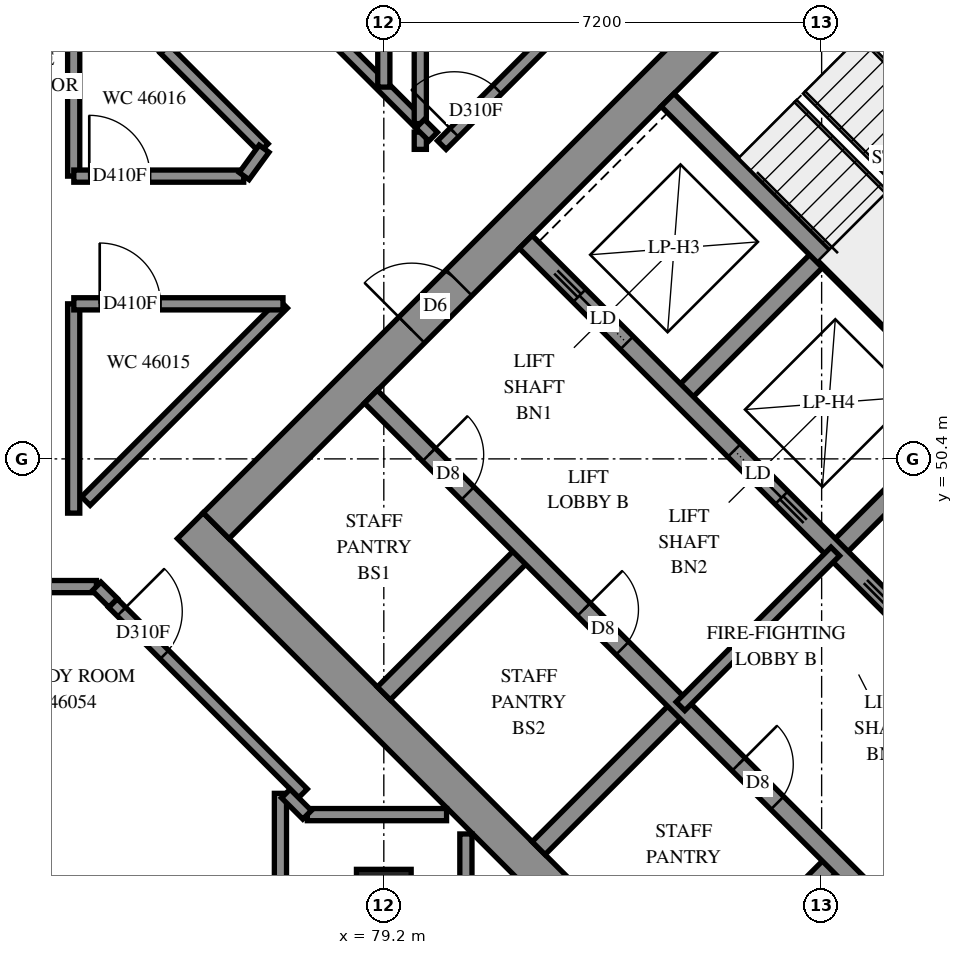
"""IFC4 building model, lengths in metres.
Left out: names, types, materials, properties, quantities, classifications, styles, units other than length and angle.
Written with IfcOpenShell. Run it as: python <this file> out.ifc"""

import sys

from ifc_helpers import new_model, si_unit, direction, frame, frame_2d, origin, origin_2d, place, context, subcontext, project, spatial, rectangle, extrude, element, fill, save


model = new_model("IFC4")
c1 = context("Model", 3, precision=1e-05, world=origin(), true_north=direction((0.0, 1.0)))
c2 = subcontext(c1, "Body", "Model", "MODEL_VIEW")
j1 = project(units=[si_unit("LENGTHUNIT", "METRE"), si_unit("PLANEANGLEUNIT", "RADIAN")], contexts=[c1])
p1 = place(None, origin())
s1 = spatial("IfcSite", under=j1, at=p1, CompositionType="ELEMENT")
p2 = place(p1, origin())
s2 = spatial("IfcBuilding", under=s1, at=p2, CompositionType="ELEMENT")
p3 = place(p2, frame((0.0, 0.0, 169.4)))
s3 = spatial("IfcBuildingStorey", under=s2, at=p3, CompositionType="ELEMENT", Elevation=169.4)
p4 = place(p3, frame((79.2, 43.2, 0.0), z_axis=(0.0, 0.0, 1.0), x_axis=(1.0, 0.0, 0.0)))
e1 = element("IfcColumn", 1, at=p4, inside=s3, PredefinedType="COLUMN", context=c2, shape_type="SweptSolid", body=[
    extrude(rectangle(XDim=0.9, YDim=0.9, at=origin_2d()), origin(), (0.0, 0.0, 1.0), 3.1),
])
p5 = place(p3, frame((76.018, 49.302, -0.3), z_axis=(0.0, 0.0, 1.0), x_axis=(0.7071067812, -0.7071067812, 0.0)))
e2 = element("IfcWall", 2, at=p5, inside=s3, PredefinedType="SHEAR", context=c2, shape_type="SweptSolid", body=[
    extrude(rectangle(XDim=15.6, YDim=0.6, at=frame_2d((7.8, 0.0))), origin(), (0.0, 0.0, 1.0), 2.7),
])
p6 = place(p3, frame((86.625, 59.908, -0.3), z_axis=(0.0, 0.0, 1.0), x_axis=(0.7071067812, -0.7071067812, 0.0)))
e3 = element("IfcWall", 3, at=p6, inside=s3, PredefinedType="SHEAR", context=c2, shape_type="SweptSolid", body=[
    extrude(rectangle(XDim=15.6, YDim=0.6, at=frame_2d((7.8, 0.0))), origin(), (0.0, 0.0, 1.0), 2.7),
])
p7 = place(p6, frame((10.6, 0.0, 0.3)))
e4 = element("IfcOpeningElement", 4, at=p7, cuts=e3, PredefinedType="OPENING", context=c2, shape_type="SweptSolid", body=[
    extrude(rectangle(XDim=0.8, YDim=2.1, at=frame_2d((0.4, 1.05))), frame((0.0, 0.31, 0.0), z_axis=(0.0, -1.0, 0.0), x_axis=(1.0, 0.0, 0.0)), (0.0, 0.0, 1.0), 0.62),
])
p8 = place(p3, frame((76.442, 49.302, -0.3), z_axis=(0.0, 0.0, 1.0), x_axis=(0.7071067812, 0.7071067812, 0.0)))
e5 = element("IfcWall", 5, at=p8, inside=s3, PredefinedType="SHEAR", context=c2, shape_type="SweptSolid", body=[
    extrude(rectangle(XDim=14.4, YDim=0.6, at=frame_2d((7.2, 0.0))), origin(), (0.0, 0.0, 1.0), 2.7),
])
p9 = place(p8, frame((4.55, 0.0, 0.3)))
e6 = element("IfcOpeningElement", 6, at=p9, cuts=e5, PredefinedType="OPENING", context=c2, shape_type="SweptSolid", body=[
    extrude(rectangle(XDim=1.1, YDim=2.1, at=frame_2d((0.55, 1.05))), frame((0.0, 0.31, 0.0), z_axis=(0.0, -1.0, 0.0), x_axis=(1.0, 0.0, 0.0)), (0.0, 0.0, 1.0), 0.62),
])
p10 = place(p8, frame((11.35, 0.0, 0.3)))
e7 = element("IfcOpeningElement", 7, at=p10, cuts=e5, PredefinedType="OPENING", context=c2, shape_type="SweptSolid", body=[
    extrude(rectangle(XDim=1.1, YDim=2.1, at=frame_2d((0.55, 1.05))), frame((0.0, 0.31, 0.0), z_axis=(0.0, -1.0, 0.0), x_axis=(1.0, 0.0, 0.0)), (0.0, 0.0, 1.0), 0.62),
])
p11 = place(p3, frame((87.049, 38.695, -0.3), z_axis=(0.0, 0.0, 1.0), x_axis=(0.7071067812, 0.7071067812, 0.0)))
e8 = element("IfcWall", 8, at=p11, inside=s3, PredefinedType="SHEAR", context=c2, shape_type="SweptSolid", body=[
    extrude(rectangle(XDim=14.4, YDim=0.6, at=frame_2d((7.2, 0.0))), origin(), (0.0, 0.0, 1.0), 2.7),
])
p12 = place(p11, frame((4.55, 0.0, 0.3)))
e9 = element("IfcOpeningElement", 9, at=p12, cuts=e8, PredefinedType="OPENING", context=c2, shape_type="SweptSolid", body=[
    extrude(rectangle(XDim=1.1, YDim=2.1, at=frame_2d((0.55, 1.05))), frame((0.0, 0.31, 0.0), z_axis=(0.0, -1.0, 0.0), x_axis=(1.0, 0.0, 0.0)), (0.0, 0.0, 1.0), 0.62),
])
p13 = place(p11, frame((11.35, 0.0, 0.3)))
e10 = element("IfcOpeningElement", 10, at=p13, cuts=e8, PredefinedType="OPENING", context=c2, shape_type="SweptSolid", body=[
    extrude(rectangle(XDim=1.1, YDim=2.1, at=frame_2d((0.55, 1.05))), frame((0.0, 0.31, 0.0), z_axis=(0.0, -1.0, 0.0), x_axis=(1.0, 0.0, 0.0)), (0.0, 0.0, 1.0), 0.62),
])
for number, where, z_axis, x_axis in (
    (11, (79.2, 46.544, 0.0), (0.0, 0.0, 1.0), (0.707, 0.707, 0.0)),
    (12, (84.079, 51.423, 0.0), (0.0, 0.0, 1.0), (0.707, 0.707, 0.0)),
):
    element("IfcWall", number, at=place(p3, frame(where, z_axis=z_axis, x_axis=x_axis)), inside=s3, PredefinedType="SOLIDWALL", context=c2, shape_type="SweptSolid", body=[
        extrude(rectangle(XDim=3.3, YDim=0.3, at=frame_2d((1.65, 0.0))), origin(), (0.0, 0.0, 1.0), 3.1),
    ])
p14 = place(p3, frame((81.746, 43.999, 0.0), z_axis=(0.0, 0.0, 1.0), x_axis=(0.7071067812, 0.7071067812, 0.0)))
e13 = element("IfcWall", 13, at=p14, inside=s3, PredefinedType="SOLIDWALL", context=c2, shape_type="SweptSolid", body=[
    extrude(rectangle(XDim=3.3, YDim=0.3, at=frame_2d((1.65, 0.0))), origin(), (0.0, 0.0, 1.0), 3.1),
])
p15 = place(p3, frame((86.625, 48.878, 0.0), z_axis=(0.0, 0.0, 1.0), x_axis=(0.7071067812, 0.7071067812, 0.0)))
e14 = element("IfcWall", 14, at=p15, inside=s3, PredefinedType="SOLIDWALL", context=c2, shape_type="SweptSolid", body=[
    extrude(rectangle(XDim=3.3, YDim=0.3, at=frame_2d((1.65, 0.0))), origin(), (0.0, 0.0, 1.0), 3.1),
])
p16 = place(p3, frame((84.291, 41.453, 0.0), z_axis=(0.0, 0.0, 1.0), x_axis=(0.7071067812, 0.7071067812, 0.0)))
e15 = element("IfcWall", 15, at=p16, inside=s3, PredefinedType="SOLIDWALL", context=c2, shape_type="SweptSolid", body=[
    extrude(rectangle(XDim=3.3, YDim=0.3, at=frame_2d((1.65, 0.0))), origin(), (0.0, 0.0, 1.0), 3.1),
])
p17 = place(p3, frame((78.988, 51.423, 0.0), z_axis=(0.0, 0.0, 1.0), x_axis=(0.7071067812, -0.7071067812, 0.0)))
e16 = element("IfcWall", 16, at=p17, inside=s3, PredefinedType="SOLIDWALL", context=c2, shape_type="SweptSolid", body=[
    extrude(rectangle(XDim=14.4, YDim=0.3, at=frame_2d((7.2, 0.0))), origin(), (0.0, 0.0, 1.0), 3.1),
])
p18 = place(p17, frame((1.35, 0.0, 0.0)))
e17 = element("IfcOpeningElement", 17, at=p18, cuts=e16, PredefinedType="OPENING", context=c2, shape_type="SweptSolid", body=[
    extrude(rectangle(XDim=0.9, YDim=2.1, at=frame_2d((0.45, 1.05))), frame((0.0, 0.16, 0.0), z_axis=(0.0, -1.0, 0.0), x_axis=(1.0, 0.0, 0.0)), (0.0, 0.0, 1.0), 0.32),
])
p19 = place(p17, frame((4.95, 0.0, 0.0)))
e18 = element("IfcOpeningElement", 18, at=p19, cuts=e16, PredefinedType="OPENING", context=c2, shape_type="SweptSolid", body=[
    extrude(rectangle(XDim=0.9, YDim=2.1, at=frame_2d((0.45, 1.05))), frame((0.0, 0.16, 0.0), z_axis=(0.0, -1.0, 0.0), x_axis=(1.0, 0.0, 0.0)), (0.0, 0.0, 1.0), 0.32),
])
p20 = place(p17, frame((8.55, 0.0, 0.0)))
e19 = element("IfcOpeningElement", 19, at=p20, cuts=e16, PredefinedType="OPENING", context=c2, shape_type="SweptSolid", body=[
    extrude(rectangle(XDim=0.9, YDim=2.1, at=frame_2d((0.45, 1.05))), frame((0.0, 0.16, 0.0), z_axis=(0.0, -1.0, 0.0), x_axis=(1.0, 0.0, 0.0)), (0.0, 0.0, 1.0), 0.32),
])
p21 = place(p17, frame((12.05, 0.0, 0.0)))
e20 = element("IfcOpeningElement", 20, at=p21, cuts=e16, PredefinedType="OPENING", context=c2, shape_type="SweptSolid", body=[
    extrude(rectangle(XDim=1.1, YDim=2.1, at=frame_2d((0.55, 1.05))), frame((0.0, 0.16, 0.0), z_axis=(0.0, -1.0, 0.0), x_axis=(1.0, 0.0, 0.0)), (0.0, 0.0, 1.0), 0.32),
])
p22 = place(p3, frame((81.534, 53.969, 0.0), z_axis=(0.0, 0.0, 1.0), x_axis=(0.707103309, -0.7071102534, 0.0)))
e21 = element("IfcWall", 21, at=p22, inside=s3, PredefinedType="SOLIDWALL", context=c2, shape_type="SweptSolid", body=[
    extrude(rectangle(XDim=14.4, YDim=0.3, at=frame_2d((7.2, 0.0))), origin(), (0.0, 0.0, 1.0), 3.1),
])
p23 = place(p22, frame((1.25, 0.0, 0.0)))
e22 = element("IfcOpeningElement", 22, at=p23, cuts=e21, PredefinedType="OPENING", context=c2, shape_type="SweptSolid", body=[
    extrude(rectangle(XDim=1.1, YDim=2.1, at=frame_2d((0.55, 1.05))), frame((0.0, 0.16, 0.0), z_axis=(0.0, -1.0, 0.0), x_axis=(1.0, 0.0, 0.0)), (0.0, 0.0, 1.0), 0.32),
])
p24 = place(p22, frame((4.85, 0.0, 0.0)))
e23 = element("IfcOpeningElement", 23, at=p24, cuts=e21, PredefinedType="OPENING", context=c2, shape_type="SweptSolid", body=[
    extrude(rectangle(XDim=1.1, YDim=2.1, at=frame_2d((0.55, 1.05))), frame((0.0, 0.16, 0.0), z_axis=(0.0, -1.0, 0.0), x_axis=(1.0, 0.0, 0.0)), (0.0, 0.0, 1.0), 0.32),
])
p25 = place(p22, frame((8.45, 0.0, 0.0)))
e24 = element("IfcOpeningElement", 24, at=p25, cuts=e21, PredefinedType="OPENING", context=c2, shape_type="SweptSolid", body=[
    extrude(rectangle(XDim=1.1, YDim=2.1, at=frame_2d((0.55, 1.05))), frame((0.0, 0.16, 0.0), z_axis=(0.0, -1.0, 0.0), x_axis=(1.0, 0.0, 0.0)), (0.0, 0.0, 1.0), 0.32),
])
p26 = place(p22, frame((12.05, 0.0, 0.0)))
e25 = element("IfcOpeningElement", 25, at=p26, cuts=e21, PredefinedType="OPENING", context=c2, shape_type="SweptSolid", body=[
    extrude(rectangle(XDim=1.1, YDim=2.1, at=frame_2d((0.55, 1.05))), frame((0.0, 0.16, 0.0), z_axis=(0.0, -1.0, 0.0), x_axis=(1.0, 0.0, 0.0)), (0.0, 0.0, 1.0), 0.32),
])
p27 = place(p3, frame((83.867, 56.302, 0.0), z_axis=(0.0, 0.0, 1.0), x_axis=(0.7071137256, -0.7070998367, 0.0)))
e26 = element("IfcWall", 26, at=p27, inside=s3, PredefinedType="SOLIDWALL", context=c2, shape_type="SweptSolid", body=[
    extrude(rectangle(XDim=7.2, YDim=0.3, at=frame_2d((3.6, 0.0))), origin(), (0.0, 0.0, 1.0), 3.1),
])
p28 = place(p3, frame((84.079, 46.332, 0.0), z_axis=(0.0, 0.0, 1.0), x_axis=(0.7071067812, 0.7071067812, 0.0)))
e27 = element("IfcWall", 27, at=p28, inside=s3, PredefinedType="PARTITIONING", context=c2, shape_type="SweptSolid", body=[
    extrude(rectangle(XDim=3.6, YDim=0.2, at=frame_2d((1.8, 0.0))), origin(), (0.0, 0.0, 1.0), 3.1),
])
p29 = place(p3, frame((55.5, 48.3, 0.0), z_axis=(0.0, 0.0, 1.0), x_axis=(1.0, 0.0, 0.0)))
e28 = element("IfcWall", 28, at=p29, inside=s3, PredefinedType="PARTITIONING", context=c2, shape_type="SweptSolid", body=[
    extrude(rectangle(XDim=18.974, YDim=0.2, at=frame_2d((9.487, 0.0))), origin(), (0.0, 0.0, 1.0), 3.1),
])
p30 = place(p29, frame((5.963, 0.0, 0.0)))
e29 = element("IfcOpeningElement", 29, at=p30, cuts=e28, PredefinedType="OPENING", context=c2, shape_type="SweptSolid", body=[
    extrude(rectangle(XDim=1.0, YDim=2.1, at=frame_2d((0.5, 1.05))), frame((0.0, 0.11, 0.0), z_axis=(0.0, -1.0, 0.0), x_axis=(1.0, 0.0, 0.0)), (0.0, 0.0, 1.0), 0.22),
])
p31 = place(p29, frame((13.161, 0.0, 0.0)))
e30 = element("IfcOpeningElement", 30, at=p31, cuts=e28, PredefinedType="OPENING", context=c2, shape_type="SweptSolid", body=[
    extrude(rectangle(XDim=0.9, YDim=2.1, at=frame_2d((0.45, 1.05))), frame((0.0, 0.11, 0.0), z_axis=(0.0, -1.0, 0.0), x_axis=(1.0, 0.0, 0.0)), (0.0, 0.0, 1.0), 0.22),
])
p32 = place(p3, frame((80.154, 55.56, 0.0), z_axis=(0.0, 0.0, 1.0), x_axis=(0.7071067812, 0.7071067812, 0.0)))
e31 = element("IfcWall", 31, at=p32, inside=s3, PredefinedType="PARTITIONING", context=c2, shape_type="SweptSolid", body=[
    extrude(rectangle(XDim=9.45, YDim=0.2, at=frame_2d((4.725, 0.0))), origin(), (0.0, 0.0, 1.0), 3.1),
])
p33 = place(p32, frame((0.292, 0.0, 0.0)))
e32 = element("IfcOpeningElement", 32, at=p33, cuts=e31, PredefinedType="OPENING", context=c2, shape_type="SweptSolid", body=[
    extrude(rectangle(XDim=1.0, YDim=2.1, at=frame_2d((0.5, 1.05))), frame((0.0, 0.11, 0.0), z_axis=(0.0, -1.0, 0.0), x_axis=(1.0, 0.0, 0.0)), (0.0, 0.0, 1.0), 0.22),
])
p34 = place(p3, frame((74.097, 61.611, 0.0), z_axis=(0.0, 0.0, 1.0), x_axis=(0.7071067812, -0.7071067812, 0.0)))
e33 = element("IfcWall", 33, at=p34, inside=s3, PredefinedType="PARTITIONING", context=c2, shape_type="SweptSolid", body=[
    extrude(rectangle(XDim=8.061, YDim=0.2, at=frame_2d((4.03, 0.0))), origin(), (0.0, 0.0, 1.0), 3.1),
])
p35 = place(p3, frame((79.8, 55.914, 0.0), z_axis=(0.0, 0.0, 1.0), x_axis=(0.0, 1.0, 0.0)))
e34 = element("IfcWall", 34, at=p35, inside=s3, PredefinedType="PARTITIONING", context=c2, shape_type="SweptSolid", body=[
    extrude(rectangle(XDim=6.504, YDim=0.2, at=frame_2d((3.252, 0.0))), origin(), (0.0, 0.0, 1.0), 3.1),
])
p36 = place(p3, frame((74.3, 49.706, 0.0), z_axis=(0.0, 0.0, 1.0), x_axis=(0.7071067812, 0.7071067812, 0.0)))
e35 = element("IfcWall", 35, at=p36, inside=s3, PredefinedType="PARTITIONING", context=c2, shape_type="SweptSolid", body=[
    extrude(rectangle(XDim=4.588, YDim=0.2, at=frame_2d((2.294, 0.0))), origin(), (0.0, 0.0, 1.0), 3.1),
])
p37 = place(p3, frame((74.745, 48.029, 0.0), z_axis=(0.0, 0.0, 1.0), x_axis=(0.7068806156, -0.7073328745, 0.0)))
e36 = element("IfcWall", 36, at=p37, inside=s3, PredefinedType="PARTITIONING", context=c2, shape_type="SweptSolid", body=[
    extrude(rectangle(XDim=4.422, YDim=0.2, at=frame_2d((2.211, 0.0))), origin(), (0.0, 0.0, 1.0), 3.1),
])
p38 = place(p37, frame((0.199, 0.0, 0.0)))
e37 = element("IfcOpeningElement", 37, at=p38, cuts=e36, PredefinedType="OPENING", context=c2, shape_type="SweptSolid", body=[
    extrude(rectangle(XDim=1.0, YDim=2.1, at=frame_2d((0.5, 1.05))), frame((0.0, 0.11, 0.0), z_axis=(0.0, -1.0, 0.0), x_axis=(1.0, 0.0, 0.0)), (0.0, 0.0, 1.0), 0.22),
])
p39 = place(p3, frame((77.5, 40.801, 0.0), z_axis=(0.0, 0.0, 1.0), x_axis=(0.0, 1.0, 0.0)))
e38 = element("IfcWall", 38, at=p39, inside=s3, PredefinedType="PARTITIONING", context=c2, shape_type="SweptSolid", body=[
    extrude(rectangle(XDim=4.099, YDim=0.2, at=frame_2d((2.05, 0.0))), origin(), (0.0, 0.0, 1.0), 3.1),
])
p40 = place(p3, frame((74.1, 55.05, 0.0), z_axis=(0.0, 0.0, 1.0), x_axis=(0.0, 1.0, 0.0)))
e39 = element("IfcWall", 39, at=p40, inside=s3, PredefinedType="PARTITIONING", context=c2, shape_type="SweptSolid", body=[
    extrude(rectangle(XDim=3.592, YDim=0.2, at=frame_2d((1.796, 0.0))), origin(), (0.0, 0.0, 1.0), 3.1),
])
p41 = place(p3, frame((74.1, 49.508, 0.0), z_axis=(0.0, 0.0, 1.0), x_axis=(0.0, 1.0, 0.0)))
e40 = element("IfcWall", 40, at=p41, inside=s3, PredefinedType="PARTITIONING", context=c2, shape_type="SweptSolid", body=[
    extrude(rectangle(XDim=3.442, YDim=0.2, at=frame_2d((1.721, 0.0))), origin(), (0.0, 0.0, 1.0), 3.1),
])
p42 = place(p3, frame((74.102, 52.95, 0.0), z_axis=(0.0, 0.0, 1.0), x_axis=(1.0, 0.0, 0.0)))
e41 = element("IfcWall", 41, at=p42, inside=s3, PredefinedType="PARTITIONING", context=c2, shape_type="SweptSolid", body=[
    extrude(rectangle(XDim=3.44, YDim=0.2, at=frame_2d((1.72, 0.0))), origin(), (0.0, 0.0, 1.0), 3.1),
])
p43 = place(p42, frame((0.426, 0.0, 0.0)))
e42 = element("IfcOpeningElement", 42, at=p43, cuts=e41, PredefinedType="OPENING", context=c2, shape_type="SweptSolid", body=[
    extrude(rectangle(XDim=1.0, YDim=2.1, at=frame_2d((0.5, 1.05))), frame((0.0, 0.11, 0.0), z_axis=(0.0, -1.0, 0.0), x_axis=(1.0, 0.0, 0.0)), (0.0, 0.0, 1.0), 0.22),
])
p44 = place(p3, frame((74.102, 55.05, 0.0), z_axis=(0.0, 0.0, 1.0), x_axis=(1.0, 0.0, 0.0)))
e43 = element("IfcWall", 43, at=p44, inside=s3, PredefinedType="PARTITIONING", context=c2, shape_type="SweptSolid", body=[
    extrude(rectangle(XDim=2.794, YDim=0.2, at=frame_2d((1.397, 0.0))), origin(), (0.0, 0.0, 1.0), 3.1),
])
p45 = place(p44, frame((0.254, 0.0, 0.0)))
e44 = element("IfcOpeningElement", 44, at=p45, cuts=e43, PredefinedType="OPENING", context=c2, shape_type="SweptSolid", body=[
    extrude(rectangle(XDim=1.0, YDim=2.1, at=frame_2d((0.5, 1.05))), frame((0.0, 0.11, 0.0), z_axis=(0.0, -1.0, 0.0), x_axis=(1.0, 0.0, 0.0)), (0.0, 0.0, 1.0), 0.22),
])
p46 = place(p3, frame((75.597, 57.141, 0.0), z_axis=(0.0, 0.0, 1.0), x_axis=(0.7071067812, -0.7071067812, 0.0)))
e45 = element("IfcWall", 45, at=p46, inside=s3, PredefinedType="PARTITIONING", context=c2, shape_type="SweptSolid", body=[
    extrude(rectangle(XDim=2.305, YDim=0.2, at=frame_2d((1.153, 0.0))), origin(), (0.0, 0.0, 1.0), 3.1),
])
for number, where, z_axis, x_axis in (
    (46, (77.942, 44.55, 0.0), (0.0, 0.0, 1.0), (1.0, 0.0, 0.0)),
    (47, (80.55, 41.942, 0.0), (0.0, 0.0, 1.0), (0.0, 1.0, 0.0)),
):
    element("IfcWall", number, at=place(p3, frame(where, z_axis=z_axis, x_axis=x_axis)), inside=s3, PredefinedType="PARTITIONING", context=c2, shape_type="SweptSolid", body=[
        extrude(rectangle(XDim=2.29, YDim=0.2, at=frame_2d((1.145, 0.0))), origin(), (0.0, 0.0, 1.0), 3.1),
    ])
p47 = place(p3, frame((75.065, 57.683, 0.0), z_axis=(0.0, 0.0, 1.0), x_axis=(0.705788785, -0.7084223253, 0.0)))
e48 = element("IfcWall", 48, at=p47, inside=s3, PredefinedType="PARTITIONING", context=c2, shape_type="SweptSolid", body=[
    extrude(rectangle(XDim=0.759, YDim=0.2, at=frame_2d((0.38, 0.0))), origin(), (0.0, 0.0, 1.0), 3.1),
])
p48 = place(p3, frame((79.2, 56.514, 0.0), z_axis=(0.0, 0.0, 1.0), x_axis=(0.0, 1.0, 0.0)))
e49 = element("IfcWall", 49, at=p48, inside=s3, PredefinedType="PARTITIONING", context=c2, shape_type="SweptSolid", body=[
    extrude(rectangle(XDim=0.636, YDim=0.2, at=frame_2d((0.318, 0.0))), origin(), (0.0, 0.0, 1.0), 3.1),
])
p49 = place(p3, frame((76.903, 55.051, 0.0), z_axis=(0.0, 0.0, 1.0), x_axis=(0.5890255926, 0.8081143801, 0.0)))
e50 = element("IfcWall", 50, at=p49, inside=s3, PredefinedType="PARTITIONING", context=c2, shape_type="SweptSolid", body=[
    extrude(rectangle(XDim=0.557, YDim=0.2, at=frame_2d((0.278, 0.0))), origin(), (0.0, 0.0, 1.0), 3.1),
])
p50 = place(p3, frame((77.588, 44.897, 0.0), z_axis=(0.0, 0.0, 1.0), x_axis=(0.7071067812, -0.7071067812, 0.0)))
e51 = element("IfcWall", 51, at=p50, inside=s3, PredefinedType="PARTITIONING", context=c2, shape_type="SweptSolid", body=[
    extrude(rectangle(XDim=0.495, YDim=0.2, at=frame_2d((0.247, 0.0))), origin(), (0.0, 0.0, 1.0), 3.1),
])
p51 = place(p3, frame((79.8, 55.49, 0.0), z_axis=(0.0, 0.0, 1.0), x_axis=(0.0, 1.0, 0.0)))
e52 = element("IfcWall", 52, at=p51, inside=s3, PredefinedType="PARTITIONING", context=c2, shape_type="SweptSolid", body=[
    extrude(rectangle(XDim=0.284, YDim=0.2, at=frame_2d((0.142, 0.0))), origin(), (0.0, 0.0, 1.0), 3.1),
])
p52 = place(p3, frame((74.477, 48.303, 0.0), z_axis=(0.0, 0.0, 1.0), x_axis=(0.7097111995, -0.7044927348, 0.0)))
e53 = element("IfcWall", 53, at=p52, inside=s3, PredefinedType="PARTITIONING", context=c2, shape_type="SweptSolid", body=[
    extrude(rectangle(XDim=0.383, YDim=0.2, at=frame_2d((0.192, 0.0))), origin(), (0.0, 0.0, 1.0), 3.1),
])
p53 = place(p3, frame((79.797, 55.911, 0.0), z_axis=(0.0, 0.0, 1.0), x_axis=(0.710418702, -0.7037792749, 0.0)))
e54 = element("IfcWall", 54, at=p53, inside=s3, PredefinedType="PARTITIONING", context=c2, shape_type="SweptSolid", body=[
    extrude(rectangle(XDim=0.301, YDim=0.2, at=frame_2d((0.151, 0.0))), origin(), (0.0, 0.0, 1.0), 3.1),
])
p54 = place(p9, origin())
e55 = element("IfcDoor", 55, at=p54, inside=s3, OperationType="DOUBLE_DOOR_SINGLE_SWING", PredefinedType="DOOR", context=c2, shape_type="SweptSolid", body=[
    extrude(rectangle(XDim=1.1, YDim=2.1, at=frame_2d((0.55, 1.05))), frame((0.0, 0.025, 0.0), z_axis=(0.0, -1.0, 0.0), x_axis=(1.0, 0.0, 0.0)), (0.0, 0.0, 1.0), 0.05),
])
fill(e6, e55)
p55 = place(p18, origin())
e56 = element("IfcDoor", 56, at=p55, inside=s3, OperationType="SINGLE_SWING_LEFT", PredefinedType="DOOR", context=c2, shape_type="SweptSolid", body=[
    extrude(rectangle(XDim=0.9, YDim=2.1, at=frame_2d((0.45, 1.05))), frame((0.0, 0.025, 0.0), z_axis=(0.0, -1.0, 0.0), x_axis=(1.0, 0.0, 0.0)), (0.0, 0.0, 1.0), 0.05),
])
fill(e17, e56)
p56 = place(p19, origin())
e57 = element("IfcDoor", 57, at=p56, inside=s3, OperationType="SINGLE_SWING_LEFT", PredefinedType="DOOR", context=c2, shape_type="SweptSolid", body=[
    extrude(rectangle(XDim=0.9, YDim=2.1, at=frame_2d((0.45, 1.05))), frame((0.0, 0.025, 0.0), z_axis=(0.0, -1.0, 0.0), x_axis=(1.0, 0.0, 0.0)), (0.0, 0.0, 1.0), 0.05),
])
fill(e18, e57)
p57 = place(p20, origin())
e58 = element("IfcDoor", 58, at=p57, inside=s3, OperationType="SINGLE_SWING_LEFT", PredefinedType="DOOR", context=c2, shape_type="SweptSolid", body=[
    extrude(rectangle(XDim=0.9, YDim=2.1, at=frame_2d((0.45, 1.05))), frame((0.0, 0.025, 0.0), z_axis=(0.0, -1.0, 0.0), x_axis=(1.0, 0.0, 0.0)), (0.0, 0.0, 1.0), 0.05),
])
fill(e19, e58)
p58 = place(p23, origin())
e59 = element("IfcDoor", 59, at=p58, inside=s3, OperationType="SLIDING_TO_LEFT", PredefinedType="DOOR", context=c2, shape_type="SweptSolid", body=[
    extrude(rectangle(XDim=1.1, YDim=2.1, at=frame_2d((0.55, 1.05))), frame((0.0, 0.025, 0.0), z_axis=(0.0, -1.0, 0.0), x_axis=(1.0, 0.0, 0.0)), (0.0, 0.0, 1.0), 0.05),
])
fill(e22, e59)
p59 = place(p24, origin())
e60 = element("IfcDoor", 60, at=p59, inside=s3, OperationType="SLIDING_TO_RIGHT", PredefinedType="DOOR", context=c2, shape_type="SweptSolid", body=[
    extrude(rectangle(XDim=1.1, YDim=2.1, at=frame_2d((0.55, 1.05))), frame((0.0, 0.025, 0.0), z_axis=(0.0, -1.0, 0.0), x_axis=(1.0, 0.0, 0.0)), (0.0, 0.0, 1.0), 0.05),
])
fill(e23, e60)
p60 = place(p43, origin())
e61 = element("IfcDoor", 61, at=p60, inside=s3, OperationType="SINGLE_SWING_RIGHT", PredefinedType="DOOR", context=c2, shape_type="SweptSolid", body=[
    extrude(rectangle(XDim=1.0, YDim=2.1, at=frame_2d((0.5, 1.05))), frame((0.0, 0.025, 0.0), z_axis=(0.0, -1.0, 0.0), x_axis=(1.0, 0.0, 0.0)), (0.0, 0.0, 1.0), 0.05),
])
fill(e42, e61)
p61 = place(p45, origin())
e62 = element("IfcDoor", 62, at=p61, inside=s3, OperationType="SINGLE_SWING_LEFT", PredefinedType="DOOR", context=c2, shape_type="SweptSolid", body=[
    extrude(rectangle(XDim=1.0, YDim=2.1, at=frame_2d((0.5, 1.05))), frame((0.0, 0.025, 0.0), z_axis=(0.0, -1.0, 0.0), x_axis=(1.0, 0.0, 0.0)), (0.0, 0.0, 1.0), 0.05),
])
fill(e44, e62)
p62 = place(p38, origin())
e63 = element("IfcDoor", 63, at=p62, inside=s3, OperationType="SINGLE_SWING_LEFT", PredefinedType="DOOR", context=c2, shape_type="SweptSolid", body=[
    extrude(rectangle(XDim=1.0, YDim=2.1, at=frame_2d((0.5, 1.05))), frame((0.0, 0.025, 0.0), z_axis=(0.0, -1.0, 0.0), x_axis=(1.0, 0.0, 0.0)), (0.0, 0.0, 1.0), 0.05),
])
fill(e37, e63)
p63 = place(p33, origin())
e64 = element("IfcDoor", 64, at=p63, inside=s3, OperationType="SINGLE_SWING_LEFT", PredefinedType="DOOR", context=c2, shape_type="SweptSolid", body=[
    extrude(rectangle(XDim=1.0, YDim=2.1, at=frame_2d((0.5, 1.05))), frame((0.0, 0.025, 0.0), z_axis=(0.0, -1.0, 0.0), x_axis=(1.0, 0.0, 0.0)), (0.0, 0.0, 1.0), 0.05),
])
fill(e32, e64)
save(model, sys.argv[1])
